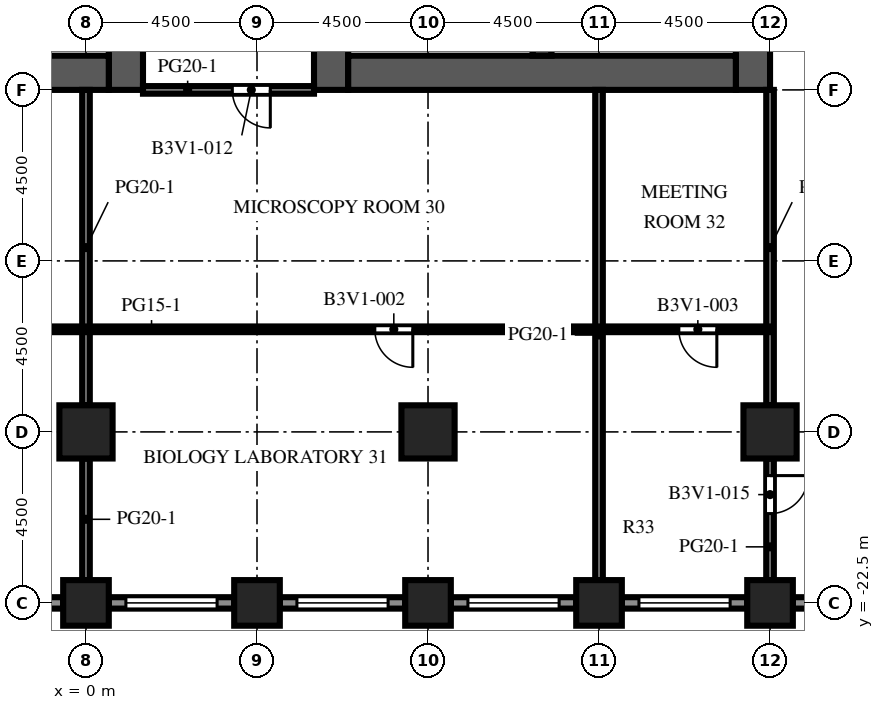
"""IFC4 building model, lengths in metres.
Left out: names, types, materials, properties, quantities, classifications, styles, units other than length and angle.
Written with IfcOpenShell. Run it as: python <this file> out.ifc"""

import sys

from ifc_helpers import new_model, si_unit, direction, frame, frame_2d, origin, origin_2d, place, context, subcontext, project, spatial, rectangle, extrude, element, fill, save


model = new_model("IFC4")
c1 = context("Model", 3, precision=1e-05, world=origin(), true_north=direction((0.0, 1.0)))
c2 = subcontext(c1, "Body", "Model", "MODEL_VIEW")
j1 = project(units=[si_unit("LENGTHUNIT", "METRE"), si_unit("PLANEANGLEUNIT", "RADIAN")], contexts=[c1])
p1 = place(None, origin())
s1 = spatial("IfcSite", under=j1, at=p1, CompositionType="ELEMENT")
p2 = place(p1, origin())
s2 = spatial("IfcBuilding", under=s1, at=p2, CompositionType="ELEMENT")
p3 = place(p2, frame((0.0, 0.0, 94.3)))
s3 = spatial("IfcBuildingStorey", under=s2, at=p3, CompositionType="ELEMENT", Elevation=94.3)
for number, where, z_axis, x_axis in (
    (1, (0.0, -22.5, 0.0), (0.0, 0.0, 1.0), (1.0, 0.0, 0.0)),
    (2, (4.5, -22.5, 0.0), (0.0, 0.0, 1.0), (1.0, 0.0, 0.0)),
    (3, (9.0, -22.5, 0.0), (0.0, 0.0, 1.0), (1.0, 0.0, 0.0)),
    (4, (13.5, -22.5, 0.0), (0.0, 0.0, 1.0), (1.0, 0.0, 0.0)),
    (5, (18.0, -22.5, 0.0), (0.0, 0.0, 1.0), (1.0, 0.0, 0.0)),
):
    element("IfcColumn", number, at=place(p3, frame(where, z_axis=z_axis, x_axis=x_axis)), inside=s3, PredefinedType="COLUMN", context=c2, shape_type="SweptSolid", body=[
        extrude(rectangle(XDim=1.2, YDim=1.2, at=origin_2d()), origin(), (0.0, 0.0, 1.0), 4.1),
    ])
for number, where, z_axis, x_axis in (
    (6, (0.0, -18.0, 0.0), (0.0, 0.0, 1.0), (1.0, 0.0, 0.0)),
    (7, (9.0, -18.0, 0.0), (0.0, 0.0, 1.0), (1.0, 0.0, 0.0)),
    (8, (18.0, -18.0, 0.0), (0.0, 0.0, 1.0), (1.0, 0.0, 0.0)),
):
    element("IfcColumn", number, at=place(p3, frame(where, z_axis=z_axis, x_axis=x_axis)), inside=s3, PredefinedType="COLUMN", context=c2, shape_type="SweptSolid", body=[
        extrude(rectangle(XDim=1.4, YDim=1.4, at=origin_2d()), origin(), (0.0, 0.0, 1.0), 4.1),
    ])
p4 = place(p3, frame((1.05, -9.0, 0.0), z_axis=(0.0, 0.0, 1.0), x_axis=(0.0, 1.0, 0.0)))
e9 = element("IfcWall", 9, at=p4, inside=s3, PredefinedType="SHEAR", context=c2, shape_type="SweptSolid", body=[
    extrude(rectangle(XDim=27.5, YDim=0.9, at=frame_2d((13.75, 0.0))), origin(), (0.0, 0.0, 1.0), 4.1),
])
p5 = place(p4, frame((12.55, 0.0, 0.0)))
e10 = element("IfcOpeningElement", 10, at=p5, cuts=e9, PredefinedType="OPENING", context=c2, shape_type="SweptSolid", body=[
    extrude(rectangle(XDim=2.4, YDim=2.4, at=frame_2d((1.2, 1.2))), frame((0.0, 0.46, 0.0), z_axis=(0.0, -1.0, 0.0), x_axis=(1.0, 0.0, 0.0)), (0.0, 0.0, 1.0), 0.92),
])
p6 = place(p4, frame((3.975, 0.0, 0.0)))
e11 = element("IfcOpeningElement", 11, at=p6, cuts=e9, PredefinedType="OPENING", context=c2, shape_type="SweptSolid", body=[
    extrude(rectangle(XDim=1.2, YDim=2.1, at=frame_2d((0.6, 1.05))), frame((0.0, 0.46, 0.0), z_axis=(0.0, -1.0, 0.0), x_axis=(1.0, 0.0, 0.0)), (0.0, 0.0, 1.0), 0.92),
])
p7 = place(p4, frame((22.325, 0.0, 0.0)))
e12 = element("IfcOpeningElement", 12, at=p7, cuts=e9, PredefinedType="OPENING", context=c2, shape_type="SweptSolid", body=[
    extrude(rectangle(XDim=1.2, YDim=2.1, at=frame_2d((0.6, 1.05))), frame((0.0, 0.46, 0.0), z_axis=(0.0, -1.0, 0.0), x_axis=(1.0, 0.0, 0.0)), (0.0, 0.0, 1.0), 0.92),
])
p8 = place(p3, frame((-9.6, -8.55, 0.0), z_axis=(0.0, 0.0, 1.0), x_axis=(1.0, 0.0, 0.0)))
e13 = element("IfcWall", 13, at=p8, inside=s3, PredefinedType="SHEAR", context=c2, shape_type="SweptSolid", body=[
    extrude(rectangle(XDim=10.2, YDim=0.9, at=frame_2d((5.1, 0.0))), origin(), (0.0, 0.0, 1.0), 4.1),
])
p9 = place(p3, frame((6.45, -9.0, 0.0), z_axis=(0.0, 0.0, 1.0), x_axis=(0.0, 1.0, 0.0)))
e14 = element("IfcWall", 14, at=p9, inside=s3, PredefinedType="SHEAR", context=c2, shape_type="SweptSolid", body=[
    extrude(rectangle(XDim=27.5, YDim=0.9, at=frame_2d((13.75, 0.0))), origin(), (0.0, 0.0, 1.0), 4.1),
])
p10 = place(p9, frame((12.55, 0.0, 0.0)))
e15 = element("IfcOpeningElement", 15, at=p10, cuts=e14, PredefinedType="OPENING", context=c2, shape_type="SweptSolid", body=[
    extrude(rectangle(XDim=2.4, YDim=2.4, at=frame_2d((1.2, 1.2))), frame((0.0, 0.46, 0.0), z_axis=(0.0, -1.0, 0.0), x_axis=(1.0, 0.0, 0.0)), (0.0, 0.0, 1.0), 0.92),
])
p11 = place(p9, frame((3.975, 0.0, 0.0)))
e16 = element("IfcOpeningElement", 16, at=p11, cuts=e14, PredefinedType="OPENING", context=c2, shape_type="SweptSolid", body=[
    extrude(rectangle(XDim=1.2, YDim=2.1, at=frame_2d((0.6, 1.05))), frame((0.0, 0.46, 0.0), z_axis=(0.0, -1.0, 0.0), x_axis=(1.0, 0.0, 0.0)), (0.0, 0.0, 1.0), 0.92),
])
p12 = place(p9, frame((22.325, 0.0, 0.0)))
e17 = element("IfcOpeningElement", 17, at=p12, cuts=e14, PredefinedType="OPENING", context=c2, shape_type="SweptSolid", body=[
    extrude(rectangle(XDim=1.2, YDim=2.1, at=frame_2d((0.6, 1.05))), frame((0.0, 0.46, 0.0), z_axis=(0.0, -1.0, 0.0), x_axis=(1.0, 0.0, 0.0)), (0.0, 0.0, 1.0), 0.92),
])
p13 = place(p3, frame((17.55, -9.0, 0.0), z_axis=(0.0, 0.0, 1.0), x_axis=(0.0, 1.0, 0.0)))
e18 = element("IfcWall", 18, at=p13, inside=s3, PredefinedType="SHEAR", context=c2, shape_type="SweptSolid", body=[
    extrude(rectangle(XDim=27.5, YDim=0.9, at=frame_2d((13.75, 0.0))), origin(), (0.0, 0.0, 1.0), 4.1),
])
p14 = place(p13, frame((12.55, 0.0, 0.0)))
e19 = element("IfcOpeningElement", 19, at=p14, cuts=e18, PredefinedType="OPENING", context=c2, shape_type="SweptSolid", body=[
    extrude(rectangle(XDim=2.4, YDim=2.4, at=frame_2d((1.2, 1.2))), frame((0.0, 0.46, 0.0), z_axis=(0.0, -1.0, 0.0), x_axis=(1.0, 0.0, 0.0)), (0.0, 0.0, 1.0), 0.92),
])
p15 = place(p13, frame((6.825, 0.0, 0.0)))
e20 = element("IfcOpeningElement", 20, at=p15, cuts=e18, PredefinedType="OPENING", context=c2, shape_type="SweptSolid", body=[
    extrude(rectangle(XDim=1.2, YDim=2.1, at=frame_2d((0.6, 1.05))), frame((0.0, 0.46, 0.0), z_axis=(0.0, -1.0, 0.0), x_axis=(1.0, 0.0, 0.0)), (0.0, 0.0, 1.0), 0.92),
])
p16 = place(p13, frame((19.475, 0.0, 0.0)))
e21 = element("IfcOpeningElement", 21, at=p16, cuts=e18, PredefinedType="OPENING", context=c2, shape_type="SweptSolid", body=[
    extrude(rectangle(XDim=1.2, YDim=2.1, at=frame_2d((0.6, 1.05))), frame((0.0, 0.46, 0.0), z_axis=(0.0, -1.0, 0.0), x_axis=(1.0, 0.0, 0.0)), (0.0, 0.0, 1.0), 0.92),
])
p17 = place(p3, frame((6.9, -8.55, 0.0), z_axis=(0.0, 0.0, 1.0), x_axis=(1.0, 0.0, 0.0)))
e22 = element("IfcWall", 22, at=p17, inside=s3, PredefinedType="SHEAR", context=c2, shape_type="SweptSolid", body=[
    extrude(rectangle(XDim=10.2, YDim=0.9, at=frame_2d((5.1, 0.0))), origin(), (0.0, 0.0, 1.0), 4.1),
])
p18 = place(p3, frame((12.0, -8.1, 0.0), z_axis=(0.0, 0.0, 1.0), x_axis=(0.0, 1.0, 0.0)))
e23 = element("IfcWall", 23, at=p18, inside=s3, PredefinedType="SHEAR", context=c2, shape_type="SweptSolid", body=[
    extrude(rectangle(XDim=7.35, YDim=0.5, at=frame_2d((3.675, 0.0))), origin(), (0.0, 0.0, 1.0), 4.1),
])
p19 = place(p3, frame((-0.6, -22.5, 0.0), z_axis=(0.0, 0.0, 1.0), x_axis=(-1.0, 0.0, 0.0)))
e24 = element("IfcWall", 24, at=p19, inside=s3, PredefinedType="SOLIDWALL", context=c2, shape_type="SweptSolid", body=[
    extrude(rectangle(XDim=3.3, YDim=0.3, at=frame_2d((1.65, 0.0))), origin(), (0.0, 0.0, 1.0), 2.75),
])
p20 = place(p19, frame((0.45, 0.0, 0.8)))
e25 = element("IfcOpeningElement", 25, at=p20, cuts=e24, PredefinedType="OPENING", context=c2, shape_type="SweptSolid", body=[
    extrude(rectangle(XDim=2.4, YDim=1.7, at=frame_2d((1.2, 0.85))), frame((0.0, 0.16, 0.0), z_axis=(0.0, -1.0, 0.0), x_axis=(1.0, 0.0, 0.0)), (0.0, 0.0, 1.0), 0.32),
])
p21 = place(p3, frame((3.9, -22.5, 0.0), z_axis=(0.0, 0.0, 1.0), x_axis=(-1.0, 0.0, 0.0)))
e26 = element("IfcWall", 26, at=p21, inside=s3, PredefinedType="SOLIDWALL", context=c2, shape_type="SweptSolid", body=[
    extrude(rectangle(XDim=3.3, YDim=0.3, at=frame_2d((1.65, 0.0))), origin(), (0.0, 0.0, 1.0), 2.75),
])
p22 = place(p21, frame((0.45, 0.0, 0.8)))
e27 = element("IfcOpeningElement", 27, at=p22, cuts=e26, PredefinedType="OPENING", context=c2, shape_type="SweptSolid", body=[
    extrude(rectangle(XDim=2.4, YDim=1.7, at=frame_2d((1.2, 0.85))), frame((0.0, 0.16, 0.0), z_axis=(0.0, -1.0, 0.0), x_axis=(1.0, 0.0, 0.0)), (0.0, 0.0, 1.0), 0.32),
])
p23 = place(p3, frame((8.4, -22.5, 0.0), z_axis=(0.0, 0.0, 1.0), x_axis=(-1.0, 0.0, 0.0)))
e28 = element("IfcWall", 28, at=p23, inside=s3, PredefinedType="SOLIDWALL", context=c2, shape_type="SweptSolid", body=[
    extrude(rectangle(XDim=3.3, YDim=0.3, at=frame_2d((1.65, 0.0))), origin(), (0.0, 0.0, 1.0), 2.75),
])
p24 = place(p23, frame((0.45, 0.0, 0.8)))
e29 = element("IfcOpeningElement", 29, at=p24, cuts=e28, PredefinedType="OPENING", context=c2, shape_type="SweptSolid", body=[
    extrude(rectangle(XDim=2.4, YDim=1.7, at=frame_2d((1.2, 0.85))), frame((0.0, 0.16, 0.0), z_axis=(0.0, -1.0, 0.0), x_axis=(1.0, 0.0, 0.0)), (0.0, 0.0, 1.0), 0.32),
])
p25 = place(p3, frame((12.9, -22.5, 0.0), z_axis=(0.0, 0.0, 1.0), x_axis=(-1.0, 0.0, 0.0)))
e30 = element("IfcWall", 30, at=p25, inside=s3, PredefinedType="SOLIDWALL", context=c2, shape_type="SweptSolid", body=[
    extrude(rectangle(XDim=3.3, YDim=0.3, at=frame_2d((1.65, 0.0))), origin(), (0.0, 0.0, 1.0), 2.75),
])
p26 = place(p25, frame((0.45, 0.0, 0.8)))
e31 = element("IfcOpeningElement", 31, at=p26, cuts=e30, PredefinedType="OPENING", context=c2, shape_type="SweptSolid", body=[
    extrude(rectangle(XDim=2.4, YDim=1.7, at=frame_2d((1.2, 0.85))), frame((0.0, 0.16, 0.0), z_axis=(0.0, -1.0, 0.0), x_axis=(1.0, 0.0, 0.0)), (0.0, 0.0, 1.0), 0.32),
])
p27 = place(p3, frame((17.4, -22.5, 0.0), z_axis=(0.0, 0.0, 1.0), x_axis=(-1.0, 0.0, 0.0)))
e32 = element("IfcWall", 32, at=p27, inside=s3, PredefinedType="SOLIDWALL", context=c2, shape_type="SweptSolid", body=[
    extrude(rectangle(XDim=3.3, YDim=0.3, at=frame_2d((1.65, 0.0))), origin(), (0.0, 0.0, 1.0), 2.75),
])
p28 = place(p27, frame((0.45, 0.0, 0.8)))
e33 = element("IfcOpeningElement", 33, at=p28, cuts=e32, PredefinedType="OPENING", context=c2, shape_type="SweptSolid", body=[
    extrude(rectangle(XDim=2.4, YDim=1.7, at=frame_2d((1.2, 0.85))), frame((0.0, 0.16, 0.0), z_axis=(0.0, -1.0, 0.0), x_axis=(1.0, 0.0, 0.0)), (0.0, 0.0, 1.0), 0.32),
])
p29 = place(p3, frame((21.9, -22.5, 0.0), z_axis=(0.0, 0.0, 1.0), x_axis=(-1.0, 0.0, 0.0)))
e34 = element("IfcWall", 34, at=p29, inside=s3, PredefinedType="SOLIDWALL", context=c2, shape_type="SweptSolid", body=[
    extrude(rectangle(XDim=3.3, YDim=0.3, at=frame_2d((1.65, 0.0))), origin(), (0.0, 0.0, 1.0), 2.75),
])
p30 = place(p29, frame((1.15, 0.0, 0.0)))
e35 = element("IfcOpeningElement", 35, at=p30, cuts=e34, PredefinedType="OPENING", context=c2, shape_type="SweptSolid", body=[
    extrude(rectangle(XDim=1.0, YDim=2.2, at=frame_2d((0.5, 1.1))), frame((0.0, 0.16, 0.0), z_axis=(0.0, -1.0, 0.0), x_axis=(1.0, 0.0, 0.0)), (0.0, 0.0, 1.0), 0.32),
])
p31 = place(p3, frame((-0.9, -8.1, 0.0), z_axis=(0.0, 0.0, 1.0), x_axis=(0.0, 1.0, 0.0)))
e36 = element("IfcWall", 36, at=p31, inside=s3, PredefinedType="PARTITIONING", context=c2, shape_type="SweptSolid", body=[
    extrude(rectangle(XDim=2.499, YDim=0.1, at=frame_2d((1.25, 0.0))), origin(), (0.0, 0.0, 1.0), 3.65),
])
p32 = place(p31, frame((0.75, 0.0, 0.0)))
e37 = element("IfcOpeningElement", 37, at=p32, cuts=e36, PredefinedType="OPENING", context=c2, shape_type="SweptSolid", body=[
    extrude(rectangle(XDim=1.0, YDim=2.1, at=frame_2d((0.5, 1.05))), frame((0.0, 0.06, 0.0), z_axis=(0.0, -1.0, 0.0), x_axis=(1.0, 0.0, 0.0)), (0.0, 0.0, 1.0), 0.12),
])
p33 = place(p3, frame((8.4, -8.1, 0.0), z_axis=(0.0, 0.0, 1.0), x_axis=(0.0, 1.0, 0.0)))
e38 = element("IfcWall", 38, at=p33, inside=s3, PredefinedType="PARTITIONING", context=c2, shape_type="SweptSolid", body=[
    extrude(rectangle(XDim=2.499, YDim=0.1, at=frame_2d((1.25, 0.0))), origin(), (0.0, 0.0, 1.0), 3.65),
])
p34 = place(p33, frame((0.75, 0.0, 0.0)))
e39 = element("IfcOpeningElement", 39, at=p34, cuts=e38, PredefinedType="OPENING", context=c2, shape_type="SweptSolid", body=[
    extrude(rectangle(XDim=1.0, YDim=2.1, at=frame_2d((0.5, 1.05))), frame((0.0, 0.06, 0.0), z_axis=(0.0, -1.0, 0.0), x_axis=(1.0, 0.0, 0.0)), (0.0, 0.0, 1.0), 0.12),
])
p35 = place(p3, frame((0.0, -21.9, 0.0), z_axis=(0.0, 0.0, 1.0), x_axis=(0.0, 1.0, 0.0)))
e40 = element("IfcWall", 40, at=p35, inside=s3, PredefinedType="PARTITIONING", context=c2, shape_type="SweptSolid", body=[
    extrude(rectangle(XDim=3.2, YDim=0.2, at=frame_2d((1.6, 0.0))), origin(), (0.0, 0.0, 1.0), 3.65),
])
p36 = place(p3, frame((0.0, -17.3, 0.0), z_axis=(0.0, 0.0, 1.0), x_axis=(0.0, 1.0, 0.0)))
e41 = element("IfcWall", 41, at=p36, inside=s3, PredefinedType="PARTITIONING", context=c2, shape_type="SweptSolid", body=[
    extrude(rectangle(XDim=8.3, YDim=0.2, at=frame_2d((4.15, 0.0))), origin(), (0.0, 0.0, 1.0), 3.65),
])
p37 = place(p3, frame((13.5, -21.9, 0.0), z_axis=(0.0, 0.0, 1.0), x_axis=(0.0, 1.0, 0.0)))
e42 = element("IfcWall", 42, at=p37, inside=s3, PredefinedType="PARTITIONING", context=c2, shape_type="SweptSolid", body=[
    extrude(rectangle(XDim=12.9, YDim=0.2, at=frame_2d((6.45, 0.0))), origin(), (0.0, 0.0, 1.0), 3.65),
])
p38 = place(p3, frame((18.0, -21.9, 0.0), z_axis=(0.0, 0.0, 1.0), x_axis=(0.0, 1.0, 0.0)))
e43 = element("IfcWall", 43, at=p38, inside=s3, PredefinedType="PARTITIONING", context=c2, shape_type="SweptSolid", body=[
    extrude(rectangle(XDim=3.2, YDim=0.2, at=frame_2d((1.6, 0.0))), origin(), (0.0, 0.0, 1.0), 3.65),
])
p39 = place(p38, frame((1.75, 0.0, 0.0)))
e44 = element("IfcOpeningElement", 44, at=p39, cuts=e43, PredefinedType="OPENING", context=c2, shape_type="SweptSolid", body=[
    extrude(rectangle(XDim=1.0, YDim=2.1, at=frame_2d((0.5, 1.05))), frame((0.0, 0.11, 0.0), z_axis=(0.0, -1.0, 0.0), x_axis=(1.0, 0.0, 0.0)), (0.0, 0.0, 1.0), 0.22),
])
p40 = place(p3, frame((18.0, -17.3, 0.0), z_axis=(0.0, 0.0, 1.0), x_axis=(0.0, 1.0, 0.0)))
e45 = element("IfcWall", 45, at=p40, inside=s3, PredefinedType="PARTITIONING", context=c2, shape_type="SweptSolid", body=[
    extrude(rectangle(XDim=8.3, YDim=0.2, at=frame_2d((4.15, 0.0))), origin(), (0.0, 0.0, 1.0), 3.65),
])
p41 = place(p3, frame((-10.5, -15.3, 0.0), z_axis=(0.0, 0.0, 1.0), x_axis=(1.0, 0.0, 0.0)))
e46 = element("IfcWall", 46, at=p41, inside=s3, PredefinedType="PARTITIONING", context=c2, shape_type="SweptSolid", body=[
    extrude(rectangle(XDim=28.5, YDim=0.15, at=frame_2d((14.25, 0.0))), origin(), (0.0, 0.0, 1.0), 3.65),
])
p42 = place(p41, frame((5.35, 0.0, 0.0)))
e47 = element("IfcOpeningElement", 47, at=p42, cuts=e46, PredefinedType="OPENING", context=c2, shape_type="SweptSolid", body=[
    extrude(rectangle(XDim=1.0, YDim=2.1, at=frame_2d((0.5, 1.05))), frame((0.0, 0.085, 0.0), z_axis=(0.0, -1.0, 0.0), x_axis=(1.0, 0.0, 0.0)), (0.0, 0.0, 1.0), 0.17),
])
p43 = place(p41, frame((18.1, 0.0, 0.0)))
e48 = element("IfcOpeningElement", 48, at=p43, cuts=e46, PredefinedType="OPENING", context=c2, shape_type="SweptSolid", body=[
    extrude(rectangle(XDim=1.0, YDim=2.1, at=frame_2d((0.5, 1.05))), frame((0.0, 0.085, 0.0), z_axis=(0.0, -1.0, 0.0), x_axis=(1.0, 0.0, 0.0)), (0.0, 0.0, 1.0), 0.17),
])
p44 = place(p41, frame((26.1, 0.0, 0.0)))
e49 = element("IfcOpeningElement", 49, at=p44, cuts=e46, PredefinedType="OPENING", context=c2, shape_type="SweptSolid", body=[
    extrude(rectangle(XDim=1.0, YDim=2.1, at=frame_2d((0.5, 1.05))), frame((0.0, 0.085, 0.0), z_axis=(0.0, -1.0, 0.0), x_axis=(1.0, 0.0, 0.0)), (0.0, 0.0, 1.0), 0.17),
])
p45 = place(p3, frame((6.0, -9.0, 0.0), z_axis=(0.0, 0.0, 1.0), x_axis=(-1.0, 0.0, 0.0)))
e50 = element("IfcWall", 50, at=p45, inside=s3, PredefinedType="PARTITIONING", context=c2, shape_type="SweptSolid", body=[
    extrude(rectangle(XDim=4.5, YDim=0.2, at=frame_2d((2.25, 0.0))), origin(), (0.0, 0.0, 1.0), 3.65),
])
p46 = place(p45, frame((1.15, 0.0, 0.0)))
e51 = element("IfcOpeningElement", 51, at=p46, cuts=e50, PredefinedType="OPENING", context=c2, shape_type="SweptSolid", body=[
    extrude(rectangle(XDim=1.0, YDim=2.1, at=frame_2d((0.5, 1.05))), frame((0.0, 0.11, 0.0), z_axis=(0.0, -1.0, 0.0), x_axis=(1.0, 0.0, 0.0)), (0.0, 0.0, 1.0), 0.22),
])
p47 = place(p22, origin())
e52 = element("IfcWindow", 52, at=p47, inside=s3, PartitioningType="SINGLE_PANEL", PredefinedType="WINDOW", context=c2, shape_type="SweptSolid", body=[
    extrude(rectangle(XDim=2.4, YDim=1.7, at=frame_2d((1.2, 0.85))), frame((0.0, 0.03, 0.0), z_axis=(0.0, -1.0, 0.0), x_axis=(1.0, 0.0, 0.0)), (0.0, 0.0, 1.0), 0.06),
])
fill(e27, e52)
p48 = place(p24, origin())
e53 = element("IfcWindow", 53, at=p48, inside=s3, PartitioningType="SINGLE_PANEL", PredefinedType="WINDOW", context=c2, shape_type="SweptSolid", body=[
    extrude(rectangle(XDim=2.4, YDim=1.7, at=frame_2d((1.2, 0.85))), frame((0.0, 0.03, 0.0), z_axis=(0.0, -1.0, 0.0), x_axis=(1.0, 0.0, 0.0)), (0.0, 0.0, 1.0), 0.06),
])
fill(e29, e53)
p49 = place(p26, origin())
e54 = element("IfcWindow", 54, at=p49, inside=s3, PartitioningType="SINGLE_PANEL", PredefinedType="WINDOW", context=c2, shape_type="SweptSolid", body=[
    extrude(rectangle(XDim=2.4, YDim=1.7, at=frame_2d((1.2, 0.85))), frame((0.0, 0.03, 0.0), z_axis=(0.0, -1.0, 0.0), x_axis=(1.0, 0.0, 0.0)), (0.0, 0.0, 1.0), 0.06),
])
fill(e31, e54)
p50 = place(p28, origin())
e55 = element("IfcWindow", 55, at=p50, inside=s3, PartitioningType="SINGLE_PANEL", PredefinedType="WINDOW", context=c2, shape_type="SweptSolid", body=[
    extrude(rectangle(XDim=2.4, YDim=1.7, at=frame_2d((1.2, 0.85))), frame((0.0, 0.03, 0.0), z_axis=(0.0, -1.0, 0.0), x_axis=(1.0, 0.0, 0.0)), (0.0, 0.0, 1.0), 0.06),
])
fill(e33, e55)
p51 = place(p43, origin())
e56 = element("IfcDoor", 56, at=p51, inside=s3, OperationType="SINGLE_SWING_RIGHT", PredefinedType="DOOR", context=c2, shape_type="SweptSolid", body=[
    extrude(rectangle(XDim=1.0, YDim=2.1, at=frame_2d((0.5, 1.05))), frame((0.0, 0.025, 0.0), z_axis=(0.0, -1.0, 0.0), x_axis=(1.0, 0.0, 0.0)), (0.0, 0.0, 1.0), 0.05),
])
fill(e48, e56)
p52 = place(p44, origin())
e57 = element("IfcDoor", 57, at=p52, inside=s3, OperationType="SINGLE_SWING_RIGHT", PredefinedType="DOOR", context=c2, shape_type="SweptSolid", body=[
    extrude(rectangle(XDim=1.0, YDim=2.1, at=frame_2d((0.5, 1.05))), frame((0.0, 0.025, 0.0), z_axis=(0.0, -1.0, 0.0), x_axis=(1.0, 0.0, 0.0)), (0.0, 0.0, 1.0), 0.05),
])
fill(e49, e57)
p53 = place(p46, origin())
e58 = element("IfcDoor", 58, at=p53, inside=s3, OperationType="SINGLE_SWING_LEFT", PredefinedType="DOOR", context=c2, shape_type="SweptSolid", body=[
    extrude(rectangle(XDim=1.0, YDim=2.1, at=frame_2d((0.5, 1.05))), frame((0.0, 0.025, 0.0), z_axis=(0.0, -1.0, 0.0), x_axis=(1.0, 0.0, 0.0)), (0.0, 0.0, 1.0), 0.05),
])
fill(e51, e58)
p54 = place(p39, origin())
e59 = element("IfcDoor", 59, at=p54, inside=s3, OperationType="SINGLE_SWING_RIGHT", PredefinedType="DOOR", context=c2, shape_type="SweptSolid", body=[
    extrude(rectangle(XDim=1.0, YDim=2.1, at=frame_2d((0.5, 1.05))), frame((0.0, 0.025, 0.0), z_axis=(0.0, -1.0, 0.0), x_axis=(1.0, 0.0, 0.0)), (0.0, 0.0, 1.0), 0.05),
])
fill(e44, e59)
save(model, sys.argv[1])
